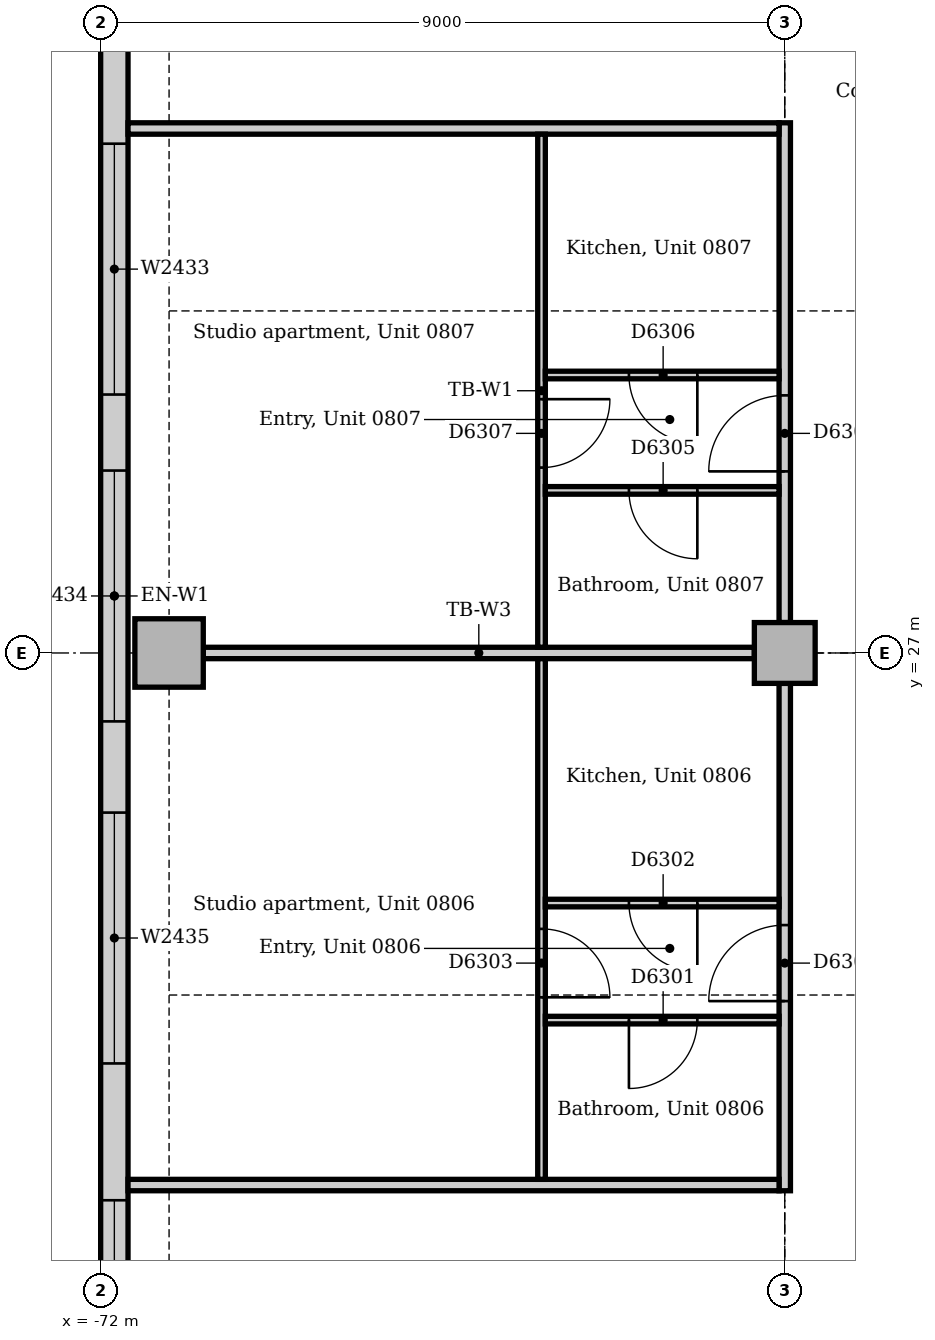
"""IFC4 building model, lengths in metres.
Left out: names, types, materials, properties, quantities, classifications, styles, units other than length and angle.
Written with IfcOpenShell. Run it as: python <this file> out.ifc"""

import sys

from ifc_helpers import new_model, si_unit, direction, frame, frame_2d, origin, origin_2d, place, context, subcontext, project, spatial, rectangle, extrude, element, fill, save


model = new_model("IFC4")
c1 = context("Model", 3, precision=1e-05, world=origin(), true_north=direction((0.0, 1.0)))
c2 = subcontext(c1, "Body", "Model", "MODEL_VIEW")
j1 = project(units=[si_unit("LENGTHUNIT", "METRE"), si_unit("PLANEANGLEUNIT", "RADIAN")], contexts=[c1])
p1 = place(None, origin())
s1 = spatial("IfcSite", under=j1, at=p1, CompositionType="ELEMENT")
p2 = place(p1, origin())
s2 = spatial("IfcBuilding", under=s1, at=p2, CompositionType="ELEMENT")
p3 = place(p2, frame((0.0, 0.0, 38.0)))
s3 = spatial("IfcBuildingStorey", under=s2, at=p3, CompositionType="ELEMENT", Elevation=38.0)
p4 = place(p3, frame((-71.1, 27.0, 0.0), z_axis=(0.0, 0.0, 1.0), x_axis=(1.0, 0.0, 0.0)))
e1 = element("IfcColumn", 1, at=p4, inside=s3, PredefinedType="COLUMN", context=c2, shape_type="SweptSolid", body=[
    extrude(rectangle(XDim=0.9, YDim=0.9, at=origin_2d()), origin(), (0.0, 0.0, 1.0), 3.85),
])
p5 = place(p3, frame((-63.0, 27.0, 0.0), z_axis=(0.0, 0.0, 1.0), x_axis=(1.0, 0.0, 0.0)))
e2 = element("IfcColumn", 2, at=p5, inside=s3, PredefinedType="COLUMN", context=c2, shape_type="SweptSolid", body=[
    extrude(rectangle(XDim=0.8, YDim=0.8, at=origin_2d()), origin(), (0.0, 0.0, 1.0), 3.85),
])
p6 = place(p3, frame((-71.82, 40.757, 0.0), z_axis=(0.0, 0.0, 1.0), x_axis=(0.0, -1.0, 0.0)))
e3 = element("IfcWall", 3, at=p6, inside=s3, PredefinedType="STANDARD", context=c2, shape_type="SweptSolid", body=[
    extrude(rectangle(XDim=26.015, YDim=0.36, at=frame_2d((13.007, 0.0))), origin(), (0.0, 0.0, 1.0), 3.85),
])
p7 = place(p6, frame((2.357, 0.0, 0.9)))
e4 = element("IfcOpeningElement", 4, at=p7, cuts=e3, PredefinedType="OPENING", context=c2, shape_type="SweptSolid", body=[
    extrude(rectangle(XDim=3.3, YDim=1.6, at=frame_2d((1.65, 0.8))), frame((0.0, 0.19, 0.0), z_axis=(0.0, -1.0, 0.0), x_axis=(1.0, 0.0, 0.0)), (0.0, 0.0, 1.0), 0.38),
])
p8 = place(p6, frame((7.057, 0.0, 0.9)))
e5 = element("IfcOpeningElement", 5, at=p8, cuts=e3, PredefinedType="OPENING", context=c2, shape_type="SweptSolid", body=[
    extrude(rectangle(XDim=3.3, YDim=1.6, at=frame_2d((1.65, 0.8))), frame((0.0, 0.19, 0.0), z_axis=(0.0, -1.0, 0.0), x_axis=(1.0, 0.0, 0.0)), (0.0, 0.0, 1.0), 0.38),
])
p9 = place(p6, frame((11.357, 0.0, 0.9)))
e6 = element("IfcOpeningElement", 6, at=p9, cuts=e3, PredefinedType="OPENING", context=c2, shape_type="SweptSolid", body=[
    extrude(rectangle(XDim=3.3, YDim=1.6, at=frame_2d((1.65, 0.8))), frame((0.0, 0.19, 0.0), z_axis=(0.0, -1.0, 0.0), x_axis=(1.0, 0.0, 0.0)), (0.0, 0.0, 1.0), 0.38),
])
p10 = place(p6, frame((15.857, 0.0, 0.9)))
e7 = element("IfcOpeningElement", 7, at=p10, cuts=e3, PredefinedType="OPENING", context=c2, shape_type="SweptSolid", body=[
    extrude(rectangle(XDim=3.3, YDim=1.6, at=frame_2d((1.65, 0.8))), frame((0.0, 0.19, 0.0), z_axis=(0.0, -1.0, 0.0), x_axis=(1.0, 0.0, 0.0)), (0.0, 0.0, 1.0), 0.38),
])
p11 = place(p6, frame((20.957, 0.0, 0.9)))
e8 = element("IfcOpeningElement", 8, at=p11, cuts=e3, PredefinedType="OPENING", context=c2, shape_type="SweptSolid", body=[
    extrude(rectangle(XDim=3.3, YDim=1.6, at=frame_2d((1.65, 0.8))), frame((0.0, 0.19, 0.0), z_axis=(0.0, -1.0, 0.0), x_axis=(1.0, 0.0, 0.0)), (0.0, 0.0, 1.0), 0.38),
])
p12 = place(p3, frame((-63.0, 19.925, 0.0), z_axis=(0.0, 0.0, 1.0), x_axis=(0.0, 1.0, 0.0)))
e9 = element("IfcWall", 9, at=p12, inside=s3, PredefinedType="PARTITIONING", context=c2, shape_type="SweptSolid", body=[
    extrude(rectangle(XDim=6.675, YDim=0.15, at=frame_2d((3.337, 0.0))), origin(), (0.0, 0.0, 1.0), 3.158),
])
p13 = place(p12, frame((2.495, 0.0, 0.0)))
e10 = element("IfcOpeningElement", 10, at=p13, cuts=e9, PredefinedType="OPENING", context=c2, shape_type="SweptSolid", body=[
    extrude(rectangle(XDim=1.0, YDim=2.1, at=frame_2d((0.5, 1.05))), frame((0.0, 0.085, 0.0), z_axis=(0.0, -1.0, 0.0), x_axis=(1.0, 0.0, 0.0)), (0.0, 0.0, 1.0), 0.17),
])
p14 = place(p3, frame((-63.0, 27.4, 0.0), z_axis=(0.0, 0.0, 1.0), x_axis=(0.0, 1.0, 0.0)))
e11 = element("IfcWall", 11, at=p14, inside=s3, PredefinedType="PARTITIONING", context=c2, shape_type="SweptSolid", body=[
    extrude(rectangle(XDim=6.575, YDim=0.15, at=frame_2d((3.288, 0.0))), origin(), (0.0, 0.0, 1.0), 3.158),
])
p15 = place(p14, frame((1.989, 0.0, 0.0)))
e12 = element("IfcOpeningElement", 12, at=p15, cuts=e11, PredefinedType="OPENING", context=c2, shape_type="SweptSolid", body=[
    extrude(rectangle(XDim=1.0, YDim=2.1, at=frame_2d((0.5, 1.05))), frame((0.0, 0.085, 0.0), z_axis=(0.0, -1.0, 0.0), x_axis=(1.0, 0.0, 0.0)), (0.0, 0.0, 1.0), 0.17),
])
for number, where, z_axis, x_axis in (
    (13, (-71.64, 20.0, 0.0), (0.0, 0.0, 1.0), (1.0, 0.0, 0.0)),
    (14, (-71.64, 33.9, 0.0), (0.0, 0.0, 1.0), (1.0, 0.0, 0.0)),
):
    element("IfcWall", number, at=place(p3, frame(where, z_axis=z_axis, x_axis=x_axis)), inside=s3, PredefinedType="PARTITIONING", context=c2, shape_type="SweptSolid", body=[
        extrude(rectangle(XDim=8.565, YDim=0.15, at=frame_2d((4.282, 0.0))), origin(), (0.0, 0.0, 1.0), 3.85),
    ])
p16 = place(p3, frame((-70.65, 27.0, 0.0), z_axis=(0.0, 0.0, 1.0), x_axis=(1.0, 0.0, 0.0)))
e15 = element("IfcWall", 15, at=p16, inside=s3, PredefinedType="PARTITIONING", context=c2, shape_type="SweptSolid", body=[
    extrude(rectangle(XDim=7.25, YDim=0.15, at=frame_2d((3.625, 0.0))), origin(), (0.0, 0.0, 1.0), 3.15),
])
p17 = place(p3, frame((-66.2, 27.075, 0.0), z_axis=(0.0, 0.0, 1.0), x_axis=(0.0, 1.0, 0.0)))
e16 = element("IfcWall", 16, at=p17, inside=s3, PredefinedType="PARTITIONING", context=c2, shape_type="SweptSolid", body=[
    extrude(rectangle(XDim=6.75, YDim=0.1, at=frame_2d((3.375, 0.0))), origin(), (0.0, 0.0, 1.0), 3.85),
])
p18 = place(p17, frame((2.364, 0.0, 0.0)))
e17 = element("IfcOpeningElement", 17, at=p18, cuts=e16, PredefinedType="OPENING", context=c2, shape_type="SweptSolid", body=[
    extrude(rectangle(XDim=0.9, YDim=2.1, at=frame_2d((0.45, 1.05))), frame((0.0, 0.06, 0.0), z_axis=(0.0, -1.0, 0.0), x_axis=(1.0, 0.0, 0.0)), (0.0, 0.0, 1.0), 0.12),
])
p19 = place(p3, frame((-66.2, 20.075, 0.0), z_axis=(0.0, 0.0, 1.0), x_axis=(0.0, 1.0, 0.0)))
e18 = element("IfcWall", 18, at=p19, inside=s3, PredefinedType="PARTITIONING", context=c2, shape_type="SweptSolid", body=[
    extrude(rectangle(XDim=6.85, YDim=0.1, at=frame_2d((3.425, 0.0))), origin(), (0.0, 0.0, 1.0), 3.85),
])
p20 = place(p19, frame((2.395, 0.0, 0.0)))
e19 = element("IfcOpeningElement", 19, at=p20, cuts=e18, PredefinedType="OPENING", context=c2, shape_type="SweptSolid", body=[
    extrude(rectangle(XDim=0.9, YDim=2.1, at=frame_2d((0.45, 1.05))), frame((0.0, 0.06, 0.0), z_axis=(0.0, -1.0, 0.0), x_axis=(1.0, 0.0, 0.0)), (0.0, 0.0, 1.0), 0.12),
])
p21 = place(p3, frame((-66.15, 22.17, 0.0), z_axis=(0.0, 0.0, 1.0), x_axis=(1.0, 0.0, 0.0)))
e20 = element("IfcWall", 20, at=p21, inside=s3, PredefinedType="PARTITIONING", context=c2, shape_type="SweptSolid", body=[
    extrude(rectangle(XDim=3.075, YDim=0.1, at=frame_2d((1.538, 0.0))), origin(), (0.0, 0.0, 1.0), 3.85),
])
p22 = place(p21, frame((1.1, 0.0, 0.0)))
e21 = element("IfcOpeningElement", 21, at=p22, cuts=e20, PredefinedType="OPENING", context=c2, shape_type="SweptSolid", body=[
    extrude(rectangle(XDim=0.9, YDim=2.1, at=frame_2d((0.45, 1.05))), frame((0.0, 0.06, 0.0), z_axis=(0.0, -1.0, 0.0), x_axis=(1.0, 0.0, 0.0)), (0.0, 0.0, 1.0), 0.12),
])
p23 = place(p3, frame((-66.15, 23.71, 0.0), z_axis=(0.0, 0.0, 1.0), x_axis=(1.0, 0.0, 0.0)))
e22 = element("IfcWall", 22, at=p23, inside=s3, PredefinedType="PARTITIONING", context=c2, shape_type="SweptSolid", body=[
    extrude(rectangle(XDim=3.075, YDim=0.1, at=frame_2d((1.538, 0.0))), origin(), (0.0, 0.0, 1.0), 3.85),
])
p24 = place(p23, frame((1.1, 0.0, 0.0)))
e23 = element("IfcOpeningElement", 23, at=p24, cuts=e22, PredefinedType="OPENING", context=c2, shape_type="SweptSolid", body=[
    extrude(rectangle(XDim=0.9, YDim=2.1, at=frame_2d((0.45, 1.05))), frame((0.0, 0.06, 0.0), z_axis=(0.0, -1.0, 0.0), x_axis=(1.0, 0.0, 0.0)), (0.0, 0.0, 1.0), 0.12),
])
p25 = place(p3, frame((-66.15, 29.139, 0.0), z_axis=(0.0, 0.0, 1.0), x_axis=(1.0, 0.0, 0.0)))
e24 = element("IfcWall", 24, at=p25, inside=s3, PredefinedType="PARTITIONING", context=c2, shape_type="SweptSolid", body=[
    extrude(rectangle(XDim=3.075, YDim=0.1, at=frame_2d((1.538, 0.0))), origin(), (0.0, 0.0, 1.0), 3.85),
])
p26 = place(p25, frame((1.1, 0.0, 0.0)))
e25 = element("IfcOpeningElement", 25, at=p26, cuts=e24, PredefinedType="OPENING", context=c2, shape_type="SweptSolid", body=[
    extrude(rectangle(XDim=0.9, YDim=2.1, at=frame_2d((0.45, 1.05))), frame((0.0, 0.06, 0.0), z_axis=(0.0, -1.0, 0.0), x_axis=(1.0, 0.0, 0.0)), (0.0, 0.0, 1.0), 0.12),
])
p27 = place(p3, frame((-66.15, 30.657, 0.0), z_axis=(0.0, 0.0, 1.0), x_axis=(1.0, 0.0, 0.0)))
e26 = element("IfcWall", 26, at=p27, inside=s3, PredefinedType="PARTITIONING", context=c2, shape_type="SweptSolid", body=[
    extrude(rectangle(XDim=3.075, YDim=0.1, at=frame_2d((1.538, 0.0))), origin(), (0.0, 0.0, 1.0), 3.85),
])
p28 = place(p27, frame((1.1, 0.0, 0.0)))
e27 = element("IfcOpeningElement", 27, at=p28, cuts=e26, PredefinedType="OPENING", context=c2, shape_type="SweptSolid", body=[
    extrude(rectangle(XDim=0.9, YDim=2.1, at=frame_2d((0.45, 1.05))), frame((0.0, 0.06, 0.0), z_axis=(0.0, -1.0, 0.0), x_axis=(1.0, 0.0, 0.0)), (0.0, 0.0, 1.0), 0.12),
])
p29 = place(p8, origin())
e28 = element("IfcWindow", 28, at=p29, inside=s3, PartitioningType="SINGLE_PANEL", PredefinedType="WINDOW", context=c2, shape_type="SweptSolid", body=[
    extrude(rectangle(XDim=3.3, YDim=1.6, at=frame_2d((1.65, 0.8))), frame((0.0, 0.13, 0.0), z_axis=(0.0, -1.0, 0.0), x_axis=(1.0, 0.0, 0.0)), (0.0, 0.0, 1.0), 0.06),
])
fill(e5, e28)
p30 = place(p9, origin())
e29 = element("IfcWindow", 29, at=p30, inside=s3, PartitioningType="SINGLE_PANEL", PredefinedType="WINDOW", context=c2, shape_type="SweptSolid", body=[
    extrude(rectangle(XDim=3.3, YDim=1.6, at=frame_2d((1.65, 0.8))), frame((0.0, 0.13, 0.0), z_axis=(0.0, -1.0, 0.0), x_axis=(1.0, 0.0, 0.0)), (0.0, 0.0, 1.0), 0.06),
])
fill(e6, e29)
p31 = place(p10, origin())
e30 = element("IfcWindow", 30, at=p31, inside=s3, PartitioningType="SINGLE_PANEL", PredefinedType="WINDOW", context=c2, shape_type="SweptSolid", body=[
    extrude(rectangle(XDim=3.3, YDim=1.6, at=frame_2d((1.65, 0.8))), frame((0.0, 0.13, 0.0), z_axis=(0.0, -1.0, 0.0), x_axis=(1.0, 0.0, 0.0)), (0.0, 0.0, 1.0), 0.06),
])
fill(e7, e30)
p32 = place(p11, origin())
e31 = element("IfcWindow", 31, at=p32, inside=s3, PartitioningType="SINGLE_PANEL", PredefinedType="WINDOW", context=c2, shape_type="SweptSolid", body=[
    extrude(rectangle(XDim=3.3, YDim=1.6, at=frame_2d((1.65, 0.8))), frame((0.0, 0.13, 0.0), z_axis=(0.0, -1.0, 0.0), x_axis=(1.0, 0.0, 0.0)), (0.0, 0.0, 1.0), 0.06),
])
fill(e8, e31)
p33 = place(p22, frame((0.9, 0.0, 0.0), z_axis=(0.0, 0.0, 1.0), x_axis=(-1.0, 0.0, 0.0)))
e32 = element("IfcDoor", 32, at=p33, inside=s3, OperationType="SINGLE_SWING_RIGHT", PredefinedType="DOOR", context=c2, shape_type="SweptSolid", body=[
    extrude(rectangle(XDim=0.9, YDim=2.1, at=frame_2d((0.45, 1.05))), frame((0.0, 0.025, 0.0), z_axis=(0.0, -1.0, 0.0), x_axis=(1.0, 0.0, 0.0)), (0.0, 0.0, 1.0), 0.05),
])
fill(e21, e32)
p34 = place(p24, frame((0.9, 0.0, 0.0), z_axis=(0.0, 0.0, 1.0), x_axis=(-1.0, 0.0, 0.0)))
e33 = element("IfcDoor", 33, at=p34, inside=s3, OperationType="SINGLE_SWING_LEFT", PredefinedType="DOOR", context=c2, shape_type="SweptSolid", body=[
    extrude(rectangle(XDim=0.9, YDim=2.1, at=frame_2d((0.45, 1.05))), frame((0.0, 0.025, 0.0), z_axis=(0.0, -1.0, 0.0), x_axis=(1.0, 0.0, 0.0)), (0.0, 0.0, 1.0), 0.05),
])
fill(e23, e33)
p35 = place(p20, frame((0.9, 0.0, 0.0), z_axis=(0.0, 0.0, 1.0), x_axis=(-1.0, 0.0, 0.0)))
e34 = element("IfcDoor", 34, at=p35, inside=s3, OperationType="SINGLE_SWING_RIGHT", PredefinedType="DOOR", context=c2, shape_type="SweptSolid", body=[
    extrude(rectangle(XDim=0.9, YDim=2.1, at=frame_2d((0.45, 1.05))), frame((0.0, 0.025, 0.0), z_axis=(0.0, -1.0, 0.0), x_axis=(1.0, 0.0, 0.0)), (0.0, 0.0, 1.0), 0.05),
])
fill(e19, e34)
p36 = place(p13, origin())
e35 = element("IfcDoor", 35, at=p36, inside=s3, OperationType="SINGLE_SWING_LEFT", PredefinedType="DOOR", context=c2, shape_type="SweptSolid", body=[
    extrude(rectangle(XDim=1.0, YDim=2.1, at=frame_2d((0.5, 1.05))), frame((0.0, 0.025, 0.0), z_axis=(0.0, -1.0, 0.0), x_axis=(1.0, 0.0, 0.0)), (0.0, 0.0, 1.0), 0.05),
])
fill(e10, e35)
p37 = place(p26, frame((0.9, 0.0, 0.0), z_axis=(0.0, 0.0, 1.0), x_axis=(-1.0, 0.0, 0.0)))
e36 = element("IfcDoor", 36, at=p37, inside=s3, OperationType="SINGLE_SWING_LEFT", PredefinedType="DOOR", context=c2, shape_type="SweptSolid", body=[
    extrude(rectangle(XDim=0.9, YDim=2.1, at=frame_2d((0.45, 1.05))), frame((0.0, 0.025, 0.0), z_axis=(0.0, -1.0, 0.0), x_axis=(1.0, 0.0, 0.0)), (0.0, 0.0, 1.0), 0.05),
])
fill(e25, e36)
p38 = place(p28, frame((0.9, 0.0, 0.0), z_axis=(0.0, 0.0, 1.0), x_axis=(-1.0, 0.0, 0.0)))
e37 = element("IfcDoor", 37, at=p38, inside=s3, OperationType="SINGLE_SWING_LEFT", PredefinedType="DOOR", context=c2, shape_type="SweptSolid", body=[
    extrude(rectangle(XDim=0.9, YDim=2.1, at=frame_2d((0.45, 1.05))), frame((0.0, 0.025, 0.0), z_axis=(0.0, -1.0, 0.0), x_axis=(1.0, 0.0, 0.0)), (0.0, 0.0, 1.0), 0.05),
])
fill(e27, e37)
p39 = place(p18, frame((0.9, 0.0, 0.0), z_axis=(0.0, 0.0, 1.0), x_axis=(-1.0, 0.0, 0.0)))
e38 = element("IfcDoor", 38, at=p39, inside=s3, OperationType="SINGLE_SWING_LEFT", PredefinedType="DOOR", context=c2, shape_type="SweptSolid", body=[
    extrude(rectangle(XDim=0.9, YDim=2.1, at=frame_2d((0.45, 1.05))), frame((0.0, 0.025, 0.0), z_axis=(0.0, -1.0, 0.0), x_axis=(1.0, 0.0, 0.0)), (0.0, 0.0, 1.0), 0.05),
])
fill(e17, e38)
p40 = place(p15, origin())
e39 = element("IfcDoor", 39, at=p40, inside=s3, OperationType="SINGLE_SWING_LEFT", PredefinedType="DOOR", context=c2, shape_type="SweptSolid", body=[
    extrude(rectangle(XDim=1.0, YDim=2.1, at=frame_2d((0.5, 1.05))), frame((0.0, 0.025, 0.0), z_axis=(0.0, -1.0, 0.0), x_axis=(1.0, 0.0, 0.0)), (0.0, 0.0, 1.0), 0.05),
])
fill(e12, e39)
save(model, sys.argv[1])
